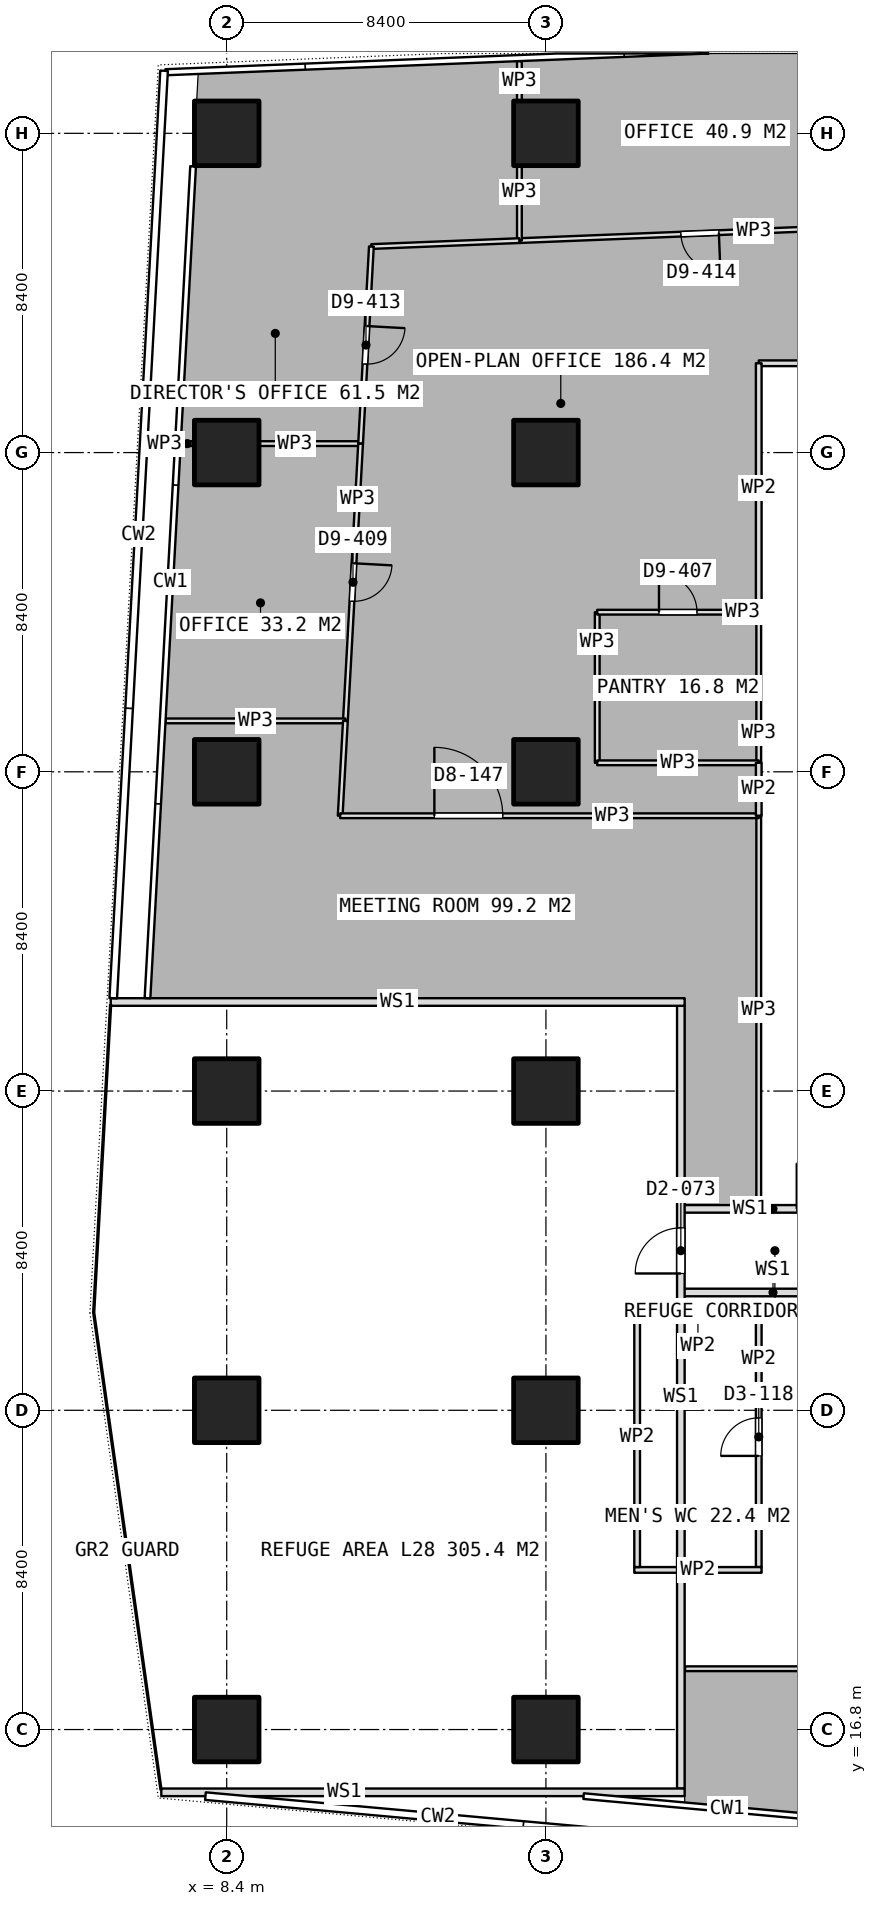
"""IFC4 building model, lengths in metres.
Left out: names, types, materials, properties, quantities, classifications, styles, units other than length and angle.
Written with IfcOpenShell. Run it as: python <this file> out.ifc"""

import sys

from ifc_helpers import new_model, si_unit, direction, frame, frame_2d, origin, origin_2d, place, context, subcontext, project, spatial, rectangle, extrude, element, fill, save


model = new_model("IFC4")
c1 = context("Model", 3, precision=1e-05, world=origin(), true_north=direction((0.0, 1.0)))
c2 = subcontext(c1, "Body", "Model", "MODEL_VIEW")
j1 = project(units=[si_unit("LENGTHUNIT", "METRE"), si_unit("PLANEANGLEUNIT", "RADIAN")], contexts=[c1])
p1 = place(None, origin())
s1 = spatial("IfcSite", under=j1, at=p1, CompositionType="ELEMENT")
p2 = place(p1, origin())
s2 = spatial("IfcBuilding", under=s1, at=p2, CompositionType="ELEMENT")
p3 = place(p2, frame((0.0, 0.0, 114.05)))
s3 = spatial("IfcBuildingStorey", under=s2, at=p3, CompositionType="ELEMENT", Elevation=114.05)
for number, where, z_axis, x_axis in (
    (1, (8.4, 16.8, 0.0), (0.0, 0.0, 1.0), (1.0, 0.0, 0.0)),
    (2, (8.4, 25.2, 0.0), (0.0, 0.0, 1.0), (1.0, 0.0, 0.0)),
    (3, (8.4, 33.6, 0.0), (0.0, 0.0, 1.0), (1.0, 0.0, 0.0)),
    (4, (8.4, 42.0, 0.0), (0.0, 0.0, 1.0), (1.0, 0.0, 0.0)),
    (5, (8.4, 50.4, 0.0), (0.0, 0.0, 1.0), (1.0, 0.0, 0.0)),
    (6, (8.4, 58.8, 0.0), (0.0, 0.0, 1.0), (1.0, 0.0, 0.0)),
    (7, (16.8, 16.8, 0.0), (0.0, 0.0, 1.0), (1.0, 0.0, 0.0)),
    (8, (16.8, 25.2, 0.0), (0.0, 0.0, 1.0), (1.0, 0.0, 0.0)),
    (9, (16.8, 33.6, 0.0), (0.0, 0.0, 1.0), (1.0, 0.0, 0.0)),
    (10, (16.8, 42.0, 0.0), (0.0, 0.0, 1.0), (1.0, 0.0, 0.0)),
    (11, (16.8, 50.4, 0.0), (0.0, 0.0, 1.0), (1.0, 0.0, 0.0)),
    (12, (16.8, 58.8, 0.0), (0.0, 0.0, 1.0), (1.0, 0.0, 0.0)),
):
    element("IfcColumn", number, at=place(p3, frame(where, z_axis=z_axis, x_axis=x_axis)), inside=s3, PredefinedType="COLUMN", context=c2, shape_type="SweptSolid", body=[
        extrude(rectangle(XDim=1.7, YDim=1.7, at=origin_2d()), origin(), (0.0, 0.0, 1.0), 3.75),
    ])
for number, where, z_axis, x_axis in (
    (13, (19.125, 21.0, 0.0), (0.0, 0.0, 1.0), (1.0, 0.0, 0.0)),
    (14, (19.125, 28.0, 0.0), (0.0, 0.0, 1.0), (1.0, 0.0, 0.0)),
):
    element("IfcWall", number, at=place(p3, frame(where, z_axis=z_axis, x_axis=x_axis)), inside=s3, PredefinedType="PARTITIONING", context=c2, shape_type="SweptSolid", body=[
        extrude(rectangle(XDim=3.35, YDim=0.15, at=frame_2d((1.675, 0.0))), origin(), (0.0, 0.0, 1.0), 3.5),
    ])
p4 = place(p3, frame((19.2, 21.075, 0.0), z_axis=(0.0, 0.0, 1.0), x_axis=(0.0, 1.0, 0.0)))
e15 = element("IfcWall", 15, at=p4, inside=s3, PredefinedType="PARTITIONING", context=c2, shape_type="SweptSolid", body=[
    extrude(rectangle(XDim=6.85, YDim=0.15, at=frame_2d((3.425, 0.0))), origin(), (0.0, 0.0, 1.0), 3.5),
])
p5 = place(p3, frame((22.4, 21.075, 0.0), z_axis=(0.0, 0.0, 1.0), x_axis=(0.0, 1.0, 0.0)))
e16 = element("IfcWall", 16, at=p5, inside=s3, PredefinedType="PARTITIONING", context=c2, shape_type="SweptSolid", body=[
    extrude(rectangle(XDim=6.85, YDim=0.15, at=frame_2d((3.425, 0.0))), origin(), (0.0, 0.0, 1.0), 3.5),
])
p6 = place(p5, frame((2.925, 0.0, 0.0)))
e17 = element("IfcOpeningElement", 17, at=p6, cuts=e16, PredefinedType="OPENING", context=c2, shape_type="SweptSolid", body=[
    extrude(rectangle(XDim=1.0, YDim=2.1, at=frame_2d((0.5, 1.05))), frame((0.0, 0.085, 0.0), z_axis=(0.0, -1.0, 0.0), x_axis=(1.0, 0.0, 0.0)), (0.0, 0.0, 1.0), 0.17),
])
p7 = place(p3, frame((25.599, 56.357, 0.0), z_axis=(0.0, 0.0, 1.0), x_axis=(-0.999200958722, -0.039968038349, 0.0)))
e18 = element("IfcWall", 18, at=p7, inside=s3, PredefinedType="PARTITIONING", context=c2, shape_type="SweptSolid", body=[
    extrude(rectangle(XDim=9.505, YDim=0.125, at=frame_2d((4.752, 0.0))), origin(), (0.0, 0.0, 1.0), 3.5),
])
p8 = place(p7, frame((4.252, 0.0, 0.0)))
e19 = element("IfcOpeningElement", 19, at=p8, cuts=e18, PredefinedType="OPENING", context=c2, shape_type="SweptSolid", body=[
    extrude(rectangle(XDim=1.0, YDim=2.1, at=frame_2d((0.5, 1.05))), frame((0.0, 0.073, 0.0), z_axis=(0.0, -1.0, 0.0), x_axis=(1.0, 0.0, 0.0)), (0.0, 0.0, 1.0), 0.145),
])
p9 = place(p3, frame((16.102, 55.977, 0.0), z_axis=(0.0, 0.0, 1.0), x_axis=(0.0, 1.0, 0.0)))
e20 = element("IfcWall", 20, at=p9, inside=s3, PredefinedType="PARTITIONING", context=c2, shape_type="SweptSolid", body=[
    extrude(rectangle(XDim=1.953, YDim=0.125, at=frame_2d((0.977, 0.0))), origin(), (0.0, 0.0, 1.0), 3.5),
])
p10 = place(p3, frame((16.102, 59.67, 0.0), z_axis=(0.0, 0.0, 1.0), x_axis=(0.0, 1.0, 0.0)))
e21 = element("IfcWall", 21, at=p10, inside=s3, PredefinedType="PARTITIONING", context=c2, shape_type="SweptSolid", body=[
    extrude(rectangle(XDim=1.03, YDim=0.125, at=frame_2d((0.515, 0.0))), origin(), (0.0, 0.0, 1.0), 3.5),
])
p11 = place(p3, frame((11.923, 50.636, 0.0), z_axis=(0.0, 0.0, 1.0), x_axis=(-1.0, 0.0, 0.0)))
e22 = element("IfcWall", 22, at=p11, inside=s3, PredefinedType="PARTITIONING", context=c2, shape_type="SweptSolid", body=[
    extrude(rectangle(XDim=2.653, YDim=0.125, at=frame_2d((1.327, 0.0))), origin(), (0.0, 0.0, 1.0), 3.5),
])
p12 = place(p3, frame((7.53, 50.636, 0.0), z_axis=(0.0, 0.0, 1.0), x_axis=(-1.0, 0.0, 0.0)))
e23 = element("IfcWall", 23, at=p12, inside=s3, PredefinedType="PARTITIONING", context=c2, shape_type="SweptSolid", body=[
    extrude(rectangle(XDim=0.334, YDim=0.125, at=frame_2d((0.167, 0.0))), origin(), (0.0, 0.0, 1.0), 3.5),
])
p13 = place(p3, frame((16.101, 55.977, 0.0), z_axis=(0.0, 0.0, 1.0), x_axis=(-0.99919845494, -0.040030583869, 0.0)))
e24 = element("IfcWall", 24, at=p13, inside=s3, PredefinedType="PARTITIONING", context=c2, shape_type="SweptSolid", body=[
    extrude(rectangle(XDim=3.897, YDim=0.125, at=frame_2d((1.949, 0.0))), origin(), (0.0, 0.0, 1.0), 3.5),
])
p14 = place(p3, frame((12.207, 55.821, 0.0), z_axis=(0.0, 0.0, 1.0), x_axis=(-0.05467841469, -0.9985040165, 0.0)))
e25 = element("IfcWall", 25, at=p14, inside=s3, PredefinedType="PARTITIONING", context=c2, shape_type="SweptSolid", body=[
    extrude(rectangle(XDim=5.193, YDim=0.125, at=frame_2d((2.596, 0.0))), origin(), (0.0, 0.0, 1.0), 3.5),
])
p15 = place(p14, frame((2.096, 0.0, 0.0)))
e26 = element("IfcOpeningElement", 26, at=p15, cuts=e25, PredefinedType="OPENING", context=c2, shape_type="SweptSolid", body=[
    extrude(rectangle(XDim=1.0, YDim=2.1, at=frame_2d((0.5, 1.05))), frame((0.0, 0.073, 0.0), z_axis=(0.0, -1.0, 0.0), x_axis=(1.0, 0.0, 0.0)), (0.0, 0.0, 1.0), 0.145),
])
p16 = place(p3, frame((11.923, 50.635, 0.0), z_axis=(0.0, 0.0, 1.0), x_axis=(-0.054770408949, -0.998498974613, 0.0)))
e27 = element("IfcWall", 27, at=p16, inside=s3, PredefinedType="PARTITIONING", context=c2, shape_type="SweptSolid", body=[
    extrude(rectangle(XDim=7.306, YDim=0.125, at=frame_2d((3.653, 0.0))), origin(), (0.0, 0.0, 1.0), 3.5),
])
p17 = place(p16, frame((3.153, 0.0, 0.0)))
e28 = element("IfcOpeningElement", 28, at=p17, cuts=e27, PredefinedType="OPENING", context=c2, shape_type="SweptSolid", body=[
    extrude(rectangle(XDim=1.0, YDim=2.1, at=frame_2d((0.5, 1.05))), frame((0.0, 0.073, 0.0), z_axis=(0.0, -1.0, 0.0), x_axis=(1.0, 0.0, 0.0)), (0.0, 0.0, 1.0), 0.145),
])
p18 = place(p3, frame((11.523, 43.34, 0.0), z_axis=(0.0, 0.0, 1.0), x_axis=(-1.0, 0.0, 0.0)))
e29 = element("IfcWall", 29, at=p18, inside=s3, PredefinedType="PARTITIONING", context=c2, shape_type="SweptSolid", body=[
    extrude(rectangle(XDim=4.727, YDim=0.125, at=frame_2d((2.364, 0.0))), origin(), (0.0, 0.0, 1.0), 3.5),
])
p19 = place(p3, frame((22.4, 40.844, 0.0), z_axis=(0.0, 0.0, 1.0), x_axis=(0.0, -1.0, 0.0)))
e30 = element("IfcWall", 30, at=p19, inside=s3, PredefinedType="PARTITIONING", context=c2, shape_type="SweptSolid", body=[
    extrude(rectangle(XDim=10.233, YDim=0.125, at=frame_2d((5.116, 0.0))), origin(), (0.0, 0.0, 1.0), 3.5),
])
p20 = place(p3, frame((11.523, 43.339, 0.0), z_axis=(0.0, 0.0, 1.0), x_axis=(-0.054809854256, -0.998496810148, 0.0)))
e31 = element("IfcWall", 31, at=p20, inside=s3, PredefinedType="PARTITIONING", context=c2, shape_type="SweptSolid", body=[
    extrude(rectangle(XDim=2.499, YDim=0.125, at=frame_2d((1.25, 0.0))), origin(), (0.0, 0.0, 1.0), 3.5),
])
p21 = place(p3, frame((11.386, 40.844, 0.0), z_axis=(0.0, 0.0, 1.0), x_axis=(1.0, 0.0, 0.0)))
e32 = element("IfcWall", 32, at=p21, inside=s3, PredefinedType="PARTITIONING", context=c2, shape_type="SweptSolid", body=[
    extrude(rectangle(XDim=11.014, YDim=0.125, at=frame_2d((5.507, 0.0))), origin(), (0.0, 0.0, 1.0), 3.5),
])
p22 = place(p21, frame((2.478, 0.0, 0.0)))
e33 = element("IfcOpeningElement", 33, at=p22, cuts=e32, PredefinedType="OPENING", context=c2, shape_type="SweptSolid", body=[
    extrude(rectangle(XDim=1.8, YDim=2.1, at=frame_2d((0.9, 1.05))), frame((0.0, 0.073, 0.0), z_axis=(0.0, -1.0, 0.0), x_axis=(1.0, 0.0, 0.0)), (0.0, 0.0, 1.0), 0.145),
])
p23 = place(p3, frame((18.15, 42.237, 0.0), z_axis=(0.0, 0.0, 1.0), x_axis=(0.0, 1.0, 0.0)))
e34 = element("IfcWall", 34, at=p23, inside=s3, PredefinedType="PARTITIONING", context=c2, shape_type="SweptSolid", body=[
    extrude(rectangle(XDim=3.963, YDim=0.125, at=frame_2d((1.981, 0.0))), origin(), (0.0, 0.0, 1.0), 3.5),
])
p24 = place(p3, frame((18.15, 46.2, 0.0), z_axis=(0.0, 0.0, 1.0), x_axis=(1.0, 0.0, 0.0)))
e35 = element("IfcWall", 35, at=p24, inside=s3, PredefinedType="PARTITIONING", context=c2, shape_type="SweptSolid", body=[
    extrude(rectangle(XDim=4.25, YDim=0.125, at=frame_2d((2.125, 0.0))), origin(), (0.0, 0.0, 1.0), 3.5),
])
p25 = place(p24, frame((1.625, 0.0, 0.0)))
e36 = element("IfcOpeningElement", 36, at=p25, cuts=e35, PredefinedType="OPENING", context=c2, shape_type="SweptSolid", body=[
    extrude(rectangle(XDim=1.0, YDim=2.1, at=frame_2d((0.5, 1.05))), frame((0.0, 0.073, 0.0), z_axis=(0.0, -1.0, 0.0), x_axis=(1.0, 0.0, 0.0)), (0.0, 0.0, 1.0), 0.145),
])
p26 = place(p3, frame((22.4, 46.2, 0.0), z_axis=(0.0, 0.0, 1.0), x_axis=(0.0, -1.0, 0.0)))
e37 = element("IfcWall", 37, at=p26, inside=s3, PredefinedType="PARTITIONING", context=c2, shape_type="SweptSolid", body=[
    extrude(rectangle(XDim=3.963, YDim=0.125, at=frame_2d((1.981, 0.0))), origin(), (0.0, 0.0, 1.0), 3.5),
])
p27 = place(p3, frame((22.4, 42.237, 0.0), z_axis=(0.0, 0.0, 1.0), x_axis=(-1.0, 0.0, 0.0)))
e38 = element("IfcWall", 38, at=p27, inside=s3, PredefinedType="PARTITIONING", context=c2, shape_type="SweptSolid", body=[
    extrude(rectangle(XDim=4.25, YDim=0.125, at=frame_2d((2.125, 0.0))), origin(), (0.0, 0.0, 1.0), 3.5),
])
p28 = place(p3, frame((33.826, 52.75, 0.0), z_axis=(0.0, 0.0, 1.0), x_axis=(-1.0, 0.0, 0.0)))
e39 = element("IfcWall", 39, at=p28, inside=s3, PredefinedType="PARTITIONING", context=c2, shape_type="SweptSolid", body=[
    extrude(rectangle(XDim=11.426, YDim=0.15, at=frame_2d((5.713, 0.0))), origin(), (0.0, 0.0, 1.0), 3.5),
])
p29 = place(p28, frame((5.213, 0.0, 0.0)))
e40 = element("IfcOpeningElement", 40, at=p29, cuts=e39, PredefinedType="OPENING", context=c2, shape_type="SweptSolid", body=[
    extrude(rectangle(XDim=1.0, YDim=2.1, at=frame_2d((0.5, 1.05))), frame((0.0, 0.085, 0.0), z_axis=(0.0, -1.0, 0.0), x_axis=(1.0, 0.0, 0.0)), (0.0, 0.0, 1.0), 0.17),
])
p30 = place(p3, frame((22.4, 52.75, 0.0), z_axis=(0.0, 0.0, 1.0), x_axis=(0.0, -1.0, 0.0)))
e41 = element("IfcWall", 41, at=p30, inside=s3, PredefinedType="PARTITIONING", context=c2, shape_type="SweptSolid", body=[
    extrude(rectangle(XDim=6.55, YDim=0.15, at=frame_2d((3.275, 0.0))), origin(), (0.0, 0.0, 1.0), 3.5),
])
p31 = place(p3, frame((22.4, 42.237, 0.0), z_axis=(0.0, 0.0, 1.0), x_axis=(0.0, -1.0, 0.0)))
e42 = element("IfcWall", 42, at=p31, inside=s3, PredefinedType="PARTITIONING", context=c2, shape_type="SweptSolid", body=[
    extrude(rectangle(XDim=1.393, YDim=0.15, at=frame_2d((0.697, 0.0))), origin(), (0.0, 0.0, 1.0), 3.5),
])
p32 = place(p3, frame((20.461, 18.4, 0.0), z_axis=(0.0, 0.0, 1.0), x_axis=(1.0, 0.0, 0.0)))
e43 = element("IfcWall", 43, at=p32, inside=s3, PredefinedType="PARTITIONING", context=c2, shape_type="SweptSolid", body=[
    extrude(rectangle(XDim=13.364, YDim=0.125, at=frame_2d((6.682, 0.0))), origin(), (0.0, 0.0, 1.0), 3.5),
])
p33 = place(p32, frame((6.252, 0.0, 0.0)))
e44 = element("IfcOpeningElement", 44, at=p33, cuts=e43, PredefinedType="OPENING", context=c2, shape_type="SweptSolid", body=[
    extrude(rectangle(XDim=1.0, YDim=2.1, at=frame_2d((0.5, 1.05))), frame((0.0, 0.073, 0.0), z_axis=(0.0, -1.0, 0.0), x_axis=(1.0, 0.0, 0.0)), (0.0, 0.0, 1.0), 0.145),
])
p34 = place(p3, frame((20.35, 15.248, 0.0), z_axis=(0.0, 0.0, 1.0), x_axis=(0.0, 1.0, 0.0)))
e45 = element("IfcWall", 45, at=p34, inside=s3, PredefinedType="PARTITIONING", context=c2, shape_type="SweptSolid", body=[
    extrude(rectangle(XDim=20.595, YDim=0.2, at=frame_2d((10.297, 0.0))), origin(), (0.0, 0.0, 1.0), 3.5),
])
p35 = place(p34, frame((13.552, 0.0, 0.0)))
e46 = element("IfcOpeningElement", 46, at=p35, cuts=e45, PredefinedType="OPENING", context=c2, shape_type="SweptSolid", body=[
    extrude(rectangle(XDim=1.2, YDim=2.1, at=frame_2d((0.6, 1.05))), frame((0.0, 0.11, 0.0), z_axis=(0.0, -1.0, 0.0), x_axis=(1.0, 0.0, 0.0)), (0.0, 0.0, 1.0), 0.22),
])
p36 = place(p3, frame((6.679, 15.148, 0.0), z_axis=(0.0, 0.0, 1.0), x_axis=(1.0, 0.0, 0.0)))
e47 = element("IfcWall", 47, at=p36, inside=s3, PredefinedType="PARTITIONING", context=c2, shape_type="SweptSolid", body=[
    extrude(rectangle(XDim=13.771, YDim=0.2, at=frame_2d((6.885, 0.0))), origin(), (0.0, 0.0, 1.0), 3.5),
])
p37 = place(p3, frame((5.348, 35.943, 0.0), z_axis=(0.0, 0.0, 1.0), x_axis=(1.0, 0.0, 0.0)))
e48 = element("IfcWall", 48, at=p37, inside=s3, PredefinedType="PARTITIONING", context=c2, shape_type="SweptSolid", body=[
    extrude(rectangle(XDim=15.102, YDim=0.2, at=frame_2d((7.551, 0.0))), origin(), (0.0, 0.0, 1.0), 3.5),
])
p38 = place(p3, frame((20.35, 30.5, 0.0), z_axis=(0.0, 0.0, 1.0), x_axis=(1.0, 0.0, 0.0)))
e49 = element("IfcWall", 49, at=p38, inside=s3, PredefinedType="PARTITIONING", context=c2, shape_type="SweptSolid", body=[
    extrude(rectangle(XDim=4.85, YDim=0.2, at=frame_2d((2.425, 0.0))), origin(), (0.0, 0.0, 1.0), 3.5),
])
p39 = place(p38, frame((3.05, 0.0, 0.0)))
e50 = element("IfcOpeningElement", 50, at=p39, cuts=e49, PredefinedType="OPENING", context=c2, shape_type="SweptSolid", body=[
    extrude(rectangle(XDim=1.2, YDim=2.1, at=frame_2d((0.6, 1.05))), frame((0.0, 0.11, 0.0), z_axis=(0.0, -1.0, 0.0), x_axis=(1.0, 0.0, 0.0)), (0.0, 0.0, 1.0), 0.22),
])
p40 = place(p3, frame((20.35, 28.3, 0.0), z_axis=(0.0, 0.0, 1.0), x_axis=(1.0, 0.0, 0.0)))
e51 = element("IfcWall", 51, at=p40, inside=s3, PredefinedType="PARTITIONING", context=c2, shape_type="SweptSolid", body=[
    extrude(rectangle(XDim=4.85, YDim=0.2, at=frame_2d((2.425, 0.0))), origin(), (0.0, 0.0, 1.0), 3.5),
])
p41 = place(p6, origin())
e52 = element("IfcDoor", 52, at=p41, inside=s3, OperationType="SINGLE_SWING_LEFT", PredefinedType="DOOR", context=c2, shape_type="SweptSolid", body=[
    extrude(rectangle(XDim=1.0, YDim=2.1, at=frame_2d((0.5, 1.05))), frame((0.0, 0.025, 0.0), z_axis=(0.0, -1.0, 0.0), x_axis=(1.0, 0.0, 0.0)), (0.0, 0.0, 1.0), 0.05),
])
fill(e17, e52)
p42 = place(p8, origin())
e53 = element("IfcDoor", 53, at=p42, inside=s3, OperationType="SINGLE_SWING_LEFT", PredefinedType="DOOR", context=c2, shape_type="SweptSolid", body=[
    extrude(rectangle(XDim=1.0, YDim=2.1, at=frame_2d((0.5, 1.05))), frame((0.0, 0.025, 0.0), z_axis=(0.0, -1.0, 0.0), x_axis=(1.0, 0.0, 0.0)), (0.0, 0.0, 1.0), 0.05),
])
fill(e19, e53)
p43 = place(p15, origin())
e54 = element("IfcDoor", 54, at=p43, inside=s3, OperationType="SINGLE_SWING_LEFT", PredefinedType="DOOR", context=c2, shape_type="SweptSolid", body=[
    extrude(rectangle(XDim=1.0, YDim=2.1, at=frame_2d((0.5, 1.05))), frame((0.0, 0.025, 0.0), z_axis=(0.0, -1.0, 0.0), x_axis=(1.0, 0.0, 0.0)), (0.0, 0.0, 1.0), 0.05),
])
fill(e26, e54)
p44 = place(p17, origin())
e55 = element("IfcDoor", 55, at=p44, inside=s3, OperationType="SINGLE_SWING_LEFT", PredefinedType="DOOR", context=c2, shape_type="SweptSolid", body=[
    extrude(rectangle(XDim=1.0, YDim=2.1, at=frame_2d((0.5, 1.05))), frame((0.0, 0.025, 0.0), z_axis=(0.0, -1.0, 0.0), x_axis=(1.0, 0.0, 0.0)), (0.0, 0.0, 1.0), 0.05),
])
fill(e28, e55)
p45 = place(p22, origin())
e56 = element("IfcDoor", 56, at=p45, inside=s3, OperationType="DOUBLE_DOOR_SINGLE_SWING", PredefinedType="DOOR", context=c2, shape_type="SweptSolid", body=[
    extrude(rectangle(XDim=1.8, YDim=2.1, at=frame_2d((0.9, 1.05))), frame((0.0, 0.025, 0.0), z_axis=(0.0, -1.0, 0.0), x_axis=(1.0, 0.0, 0.0)), (0.0, 0.0, 1.0), 0.05),
])
fill(e33, e56)
p46 = place(p25, origin())
e57 = element("IfcDoor", 57, at=p46, inside=s3, OperationType="SINGLE_SWING_LEFT", PredefinedType="DOOR", context=c2, shape_type="SweptSolid", body=[
    extrude(rectangle(XDim=1.0, YDim=2.1, at=frame_2d((0.5, 1.05))), frame((0.0, 0.025, 0.0), z_axis=(0.0, -1.0, 0.0), x_axis=(1.0, 0.0, 0.0)), (0.0, 0.0, 1.0), 0.05),
])
fill(e36, e57)
p47 = place(p35, origin())
e58 = element("IfcDoor", 58, at=p47, inside=s3, OperationType="SINGLE_SWING_LEFT", PredefinedType="DOOR", context=c2, shape_type="SweptSolid", body=[
    extrude(rectangle(XDim=1.2, YDim=2.1, at=frame_2d((0.6, 1.05))), frame((0.0, 0.025, 0.0), z_axis=(0.0, -1.0, 0.0), x_axis=(1.0, 0.0, 0.0)), (0.0, 0.0, 1.0), 0.05),
])
fill(e46, e58)
save(model, sys.argv[1])
